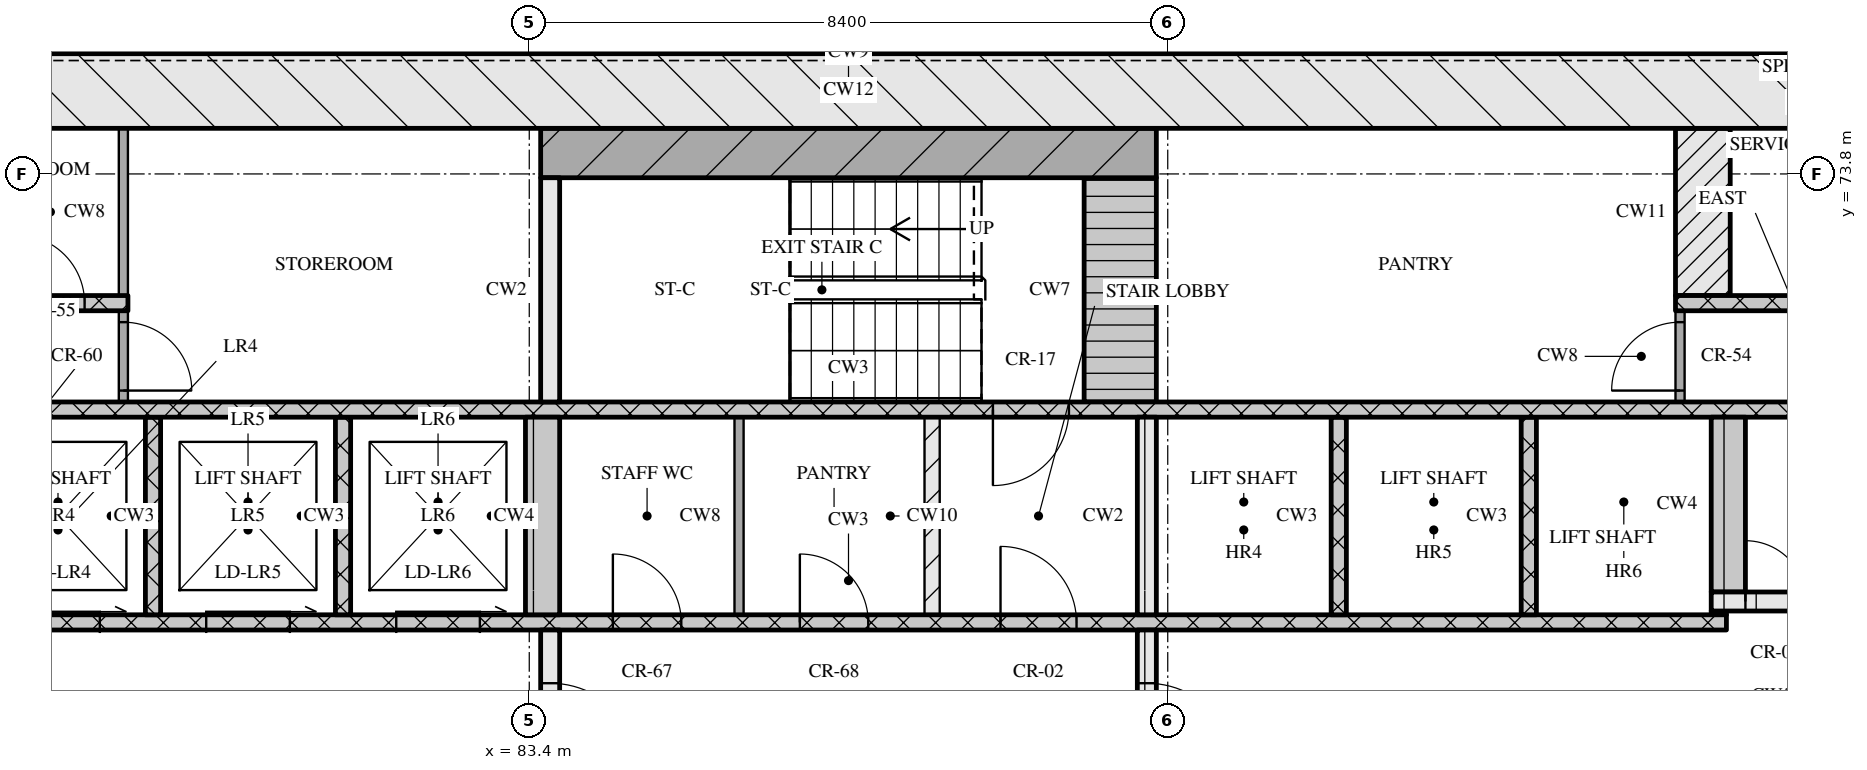
"""IFC4 building model, lengths in metres.
Left out: names, types, materials, properties, quantities, classifications, styles, units other than length and angle.
Written with IfcOpenShell. Run it as: python <this file> out.ifc"""

import sys

from ifc_helpers import new_model, si_unit, direction, frame, frame_2d, origin, place, context, subcontext, project, spatial, rectangle, extrude, element, fill, save


model = new_model("IFC4")
c1 = context("Model", 3, precision=1e-05, world=origin(), true_north=direction((0.0, 1.0)))
c2 = subcontext(c1, "Body", "Model", "MODEL_VIEW")
j1 = project(units=[si_unit("LENGTHUNIT", "METRE"), si_unit("PLANEANGLEUNIT", "RADIAN")], contexts=[c1])
p1 = place(None, origin())
s1 = spatial("IfcSite", under=j1, at=p1, CompositionType="ELEMENT")
p2 = place(p1, origin())
s2 = spatial("IfcBuilding", under=s1, at=p2, CompositionType="ELEMENT")
p3 = place(p2, frame((0.0, 0.0, 134.85)))
s3 = spatial("IfcBuildingStorey", under=s2, at=p3, CompositionType="ELEMENT", Elevation=134.85)
p4 = place(p3, frame((66.8, 74.9, 0.0), z_axis=(0.0, 0.0, 1.0), x_axis=(1.0, 0.0, 0.0)))
e1 = element("IfcWall", 1, at=p4, inside=s3, PredefinedType="SOLIDWALL", context=c2, shape_type="SweptSolid", body=[
    extrude(rectangle(XDim=41.6, YDim=1.0, at=frame_2d((20.8, 0.0))), origin(), (0.0, 0.0, 1.0), 3.32),
])
p5 = place(p3, frame((83.675, 65.2, 0.0), z_axis=(0.0, 0.0, 1.0), x_axis=(0.0, 1.0, 0.0)))
e2 = element("IfcWall", 2, at=p5, inside=s3, PredefinedType="SOLIDWALL", context=c2, shape_type="SweptSolid", body=[
    extrude(rectangle(XDim=2.6, YDim=0.25, at=frame_2d((1.3, 0.0))), origin(), (0.0, 0.0, 1.0), 3.32),
])
p6 = place(p5, frame((0.7, 0.0, 0.0)))
e3 = element("IfcOpeningElement", 3, at=p6, cuts=e2, PredefinedType="OPENING", context=c2, shape_type="SweptSolid", body=[
    extrude(rectangle(XDim=1.2, YDim=2.1, at=frame_2d((0.6, 1.05))), frame((0.0, 0.135, 0.0), z_axis=(0.0, -1.0, 0.0), x_axis=(1.0, 0.0, 0.0)), (0.0, 0.0, 1.0), 0.27),
])
p7 = place(p3, frame((91.525, 65.2, 0.0), z_axis=(0.0, 0.0, 1.0), x_axis=(0.0, 1.0, 0.0)))
e4 = element("IfcWall", 4, at=p7, inside=s3, PredefinedType="SOLIDWALL", context=c2, shape_type="SweptSolid", body=[
    extrude(rectangle(XDim=2.6, YDim=0.25, at=frame_2d((1.3, 0.0))), origin(), (0.0, 0.0, 1.0), 3.32),
])
p8 = place(p7, frame((0.7, 0.0, 0.0)))
e5 = element("IfcOpeningElement", 5, at=p8, cuts=e4, PredefinedType="OPENING", context=c2, shape_type="SweptSolid", body=[
    extrude(rectangle(XDim=1.2, YDim=2.1, at=frame_2d((0.6, 1.05))), frame((0.0, 0.135, 0.0), z_axis=(0.0, -1.0, 0.0), x_axis=(1.0, 0.0, 0.0)), (0.0, 0.0, 1.0), 0.27),
])
p9 = place(p3, frame((76.05, 67.9, 0.0), z_axis=(0.0, 0.0, 1.0), x_axis=(1.0, 0.0, 0.0)))
e6 = element("IfcWall", 6, at=p9, inside=s3, PredefinedType="SOLIDWALL", context=c2, shape_type="SweptSolid", body=[
    extrude(rectangle(XDim=23.1, YDim=0.2, at=frame_2d((11.55, 0.0))), origin(), (0.0, 0.0, 1.0), 3.32),
])
p10 = place(p9, frame((0.6, 0.0, 0.0)))
e7 = element("IfcOpeningElement", 7, at=p10, cuts=e6, PredefinedType="OPENING", context=c2, shape_type="SweptSolid", body=[
    extrude(rectangle(XDim=1.1, YDim=2.1, at=frame_2d((0.55, 1.05))), frame((0.0, 0.11, 0.0), z_axis=(0.0, -1.0, 0.0), x_axis=(1.0, 0.0, 0.0)), (0.0, 0.0, 1.0), 0.22),
])
p11 = place(p9, frame((3.1, 0.0, 0.0)))
e8 = element("IfcOpeningElement", 8, at=p11, cuts=e6, PredefinedType="OPENING", context=c2, shape_type="SweptSolid", body=[
    extrude(rectangle(XDim=1.1, YDim=2.1, at=frame_2d((0.55, 1.05))), frame((0.0, 0.11, 0.0), z_axis=(0.0, -1.0, 0.0), x_axis=(1.0, 0.0, 0.0)), (0.0, 0.0, 1.0), 0.22),
])
p12 = place(p9, frame((5.6, 0.0, 0.0)))
e9 = element("IfcOpeningElement", 9, at=p12, cuts=e6, PredefinedType="OPENING", context=c2, shape_type="SweptSolid", body=[
    extrude(rectangle(XDim=1.1, YDim=2.1, at=frame_2d((0.55, 1.05))), frame((0.0, 0.11, 0.0), z_axis=(0.0, -1.0, 0.0), x_axis=(1.0, 0.0, 0.0)), (0.0, 0.0, 1.0), 0.22),
])
p13 = place(p9, frame((8.45, 0.0, 0.0)))
e10 = element("IfcOpeningElement", 10, at=p13, cuts=e6, PredefinedType="OPENING", context=c2, shape_type="SweptSolid", body=[
    extrude(rectangle(XDim=0.9, YDim=2.1, at=frame_2d((0.45, 1.05))), frame((0.0, 0.11, 0.0), z_axis=(0.0, -1.0, 0.0), x_axis=(1.0, 0.0, 0.0)), (0.0, 0.0, 1.0), 0.22),
])
p14 = place(p9, frame((10.91, 0.0, 0.0)))
e11 = element("IfcOpeningElement", 11, at=p14, cuts=e6, PredefinedType="OPENING", context=c2, shape_type="SweptSolid", body=[
    extrude(rectangle(XDim=0.9, YDim=2.1, at=frame_2d((0.45, 1.05))), frame((0.0, 0.11, 0.0), z_axis=(0.0, -1.0, 0.0), x_axis=(1.0, 0.0, 0.0)), (0.0, 0.0, 1.0), 0.22),
])
p15 = place(p9, frame((13.55, 0.0, 0.0)))
e12 = element("IfcOpeningElement", 12, at=p15, cuts=e6, PredefinedType="OPENING", context=c2, shape_type="SweptSolid", body=[
    extrude(rectangle(XDim=1.0, YDim=2.1, at=frame_2d((0.5, 1.05))), frame((0.0, 0.11, 0.0), z_axis=(0.0, -1.0, 0.0), x_axis=(1.0, 0.0, 0.0)), (0.0, 0.0, 1.0), 0.22),
])
for number, where, z_axis, x_axis in (
    (13, (78.45, 68.0, 0.0), (0.0, 0.0, 1.0), (0.0, 1.0, 0.0)),
    (14, (80.95, 68.0, 0.0), (0.0, 0.0, 1.0), (0.0, 1.0, 0.0)),
):
    element("IfcWall", number, at=place(p3, frame(where, z_axis=z_axis, x_axis=x_axis)), inside=s3, PredefinedType="SOLIDWALL", context=c2, shape_type="SweptSolid", body=[
        extrude(rectangle(XDim=2.6, YDim=0.2, at=frame_2d((1.3, 0.0))), origin(), (0.0, 0.0, 1.0), 3.32),
    ])
p16 = place(p3, frame((83.575, 68.0, 0.0), z_axis=(0.0, 0.0, 1.0), x_axis=(0.0, 1.0, 0.0)))
e15 = element("IfcWall", 15, at=p16, inside=s3, PredefinedType="SOLIDWALL", context=c2, shape_type="SweptSolid", body=[
    extrude(rectangle(XDim=2.6, YDim=0.45, at=frame_2d((1.3, 0.0))), origin(), (0.0, 0.0, 1.0), 3.32),
])
p17 = place(p3, frame((86.16, 68.0, 0.0), z_axis=(0.0, 0.0, 1.0), x_axis=(0.0, 1.0, 0.0)))
e16 = element("IfcWall", 16, at=p17, inside=s3, PredefinedType="PARTITIONING", context=c2, shape_type="SweptSolid", body=[
    extrude(rectangle(XDim=2.6, YDim=0.12, at=frame_2d((1.3, 0.0))), origin(), (0.0, 0.0, 1.0), 3.32),
])
p18 = place(p3, frame((88.7, 68.0, 0.0), z_axis=(0.0, 0.0, 1.0), x_axis=(0.0, 1.0, 0.0)))
e17 = element("IfcWall", 17, at=p18, inside=s3, PredefinedType="PARTITIONING", context=c2, shape_type="SweptSolid", body=[
    extrude(rectangle(XDim=2.6, YDim=0.2, at=frame_2d((1.3, 0.0))), origin(), (0.0, 0.0, 1.0), 3.32),
])
p19 = place(p3, frame((91.525, 68.0, 0.0), z_axis=(0.0, 0.0, 1.0), x_axis=(0.0, 1.0, 0.0)))
e18 = element("IfcWall", 18, at=p19, inside=s3, PredefinedType="SOLIDWALL", context=c2, shape_type="SweptSolid", body=[
    extrude(rectangle(XDim=2.6, YDim=0.25, at=frame_2d((1.3, 0.0))), origin(), (0.0, 0.0, 1.0), 3.32),
])
for number, where, z_axis, x_axis in (
    (19, (94.05, 68.0, 0.0), (0.0, 0.0, 1.0), (0.0, 1.0, 0.0)),
    (20, (96.55, 68.0, 0.0), (0.0, 0.0, 1.0), (0.0, 1.0, 0.0)),
):
    element("IfcWall", number, at=place(p3, frame(where, z_axis=z_axis, x_axis=x_axis)), inside=s3, PredefinedType="SOLIDWALL", context=c2, shape_type="SweptSolid", body=[
        extrude(rectangle(XDim=2.6, YDim=0.2, at=frame_2d((1.3, 0.0))), origin(), (0.0, 0.0, 1.0), 3.32),
    ])
p20 = place(p3, frame((98.95, 68.025, 0.0), z_axis=(0.0, 0.0, 1.0), x_axis=(1.0, 0.0, 0.0)))
e21 = element("IfcWall", 21, at=p20, inside=s3, PredefinedType="SOLIDWALL", context=c2, shape_type="SweptSolid", body=[
    extrude(rectangle(XDim=0.2, YDim=0.05, at=frame_2d((0.1, 0.0))), origin(), (0.0, 0.0, 1.0), 3.32),
])
p21 = place(p3, frame((98.95, 68.175, 0.0), z_axis=(0.0, 0.0, 1.0), x_axis=(1.0, 0.0, 0.0)))
e22 = element("IfcWall", 22, at=p21, inside=s3, PredefinedType="SOLIDWALL", context=c2, shape_type="SweptSolid", body=[
    extrude(rectangle(XDim=8.45, YDim=0.25, at=frame_2d((4.225, 0.0))), origin(), (0.0, 0.0, 1.0), 3.32),
])
p22 = place(p21, frame((0.45, 0.0, 0.0)))
e23 = element("IfcOpeningElement", 23, at=p22, cuts=e22, PredefinedType="OPENING", context=c2, shape_type="SweptSolid", body=[
    extrude(rectangle(XDim=0.8, YDim=2.1, at=frame_2d((0.4, 1.05))), frame((0.0, 0.135, 0.0), z_axis=(0.0, -1.0, 0.0), x_axis=(1.0, 0.0, 0.0)), (0.0, 0.0, 1.0), 0.27),
])
p23 = place(p21, frame((1.75, 0.0, 0.0)))
e24 = element("IfcOpeningElement", 24, at=p23, cuts=e22, PredefinedType="OPENING", context=c2, shape_type="SweptSolid", body=[
    extrude(rectangle(XDim=1.0, YDim=2.1, at=frame_2d((0.5, 1.05))), frame((0.0, 0.135, 0.0), z_axis=(0.0, -1.0, 0.0), x_axis=(1.0, 0.0, 0.0)), (0.0, 0.0, 1.0), 0.27),
])
p24 = place(p3, frame((99.175, 68.3, 0.0), z_axis=(0.0, 0.0, 1.0), x_axis=(0.0, 1.0, 0.0)))
e25 = element("IfcWall", 25, at=p24, inside=s3, PredefinedType="SOLIDWALL", context=c2, shape_type="SweptSolid", body=[
    extrude(rectangle(XDim=2.3, YDim=0.45, at=frame_2d((1.15, 0.0))), origin(), (0.0, 0.0, 1.0), 3.32),
])
p25 = place(p3, frame((67.8, 70.7, 0.0), z_axis=(0.0, 0.0, 1.0), x_axis=(1.0, 0.0, 0.0)))
e26 = element("IfcWall", 26, at=p25, inside=s3, PredefinedType="SOLIDWALL", context=c2, shape_type="SweptSolid", body=[
    extrude(rectangle(XDim=39.6, YDim=0.2, at=frame_2d((19.8, 0.0))), origin(), (0.0, 0.0, 1.0), 3.32),
])
p26 = place(p25, frame((0.65, 0.0, 0.0)))
e27 = element("IfcOpeningElement", 27, at=p26, cuts=e26, PredefinedType="OPENING", context=c2, shape_type="SweptSolid", body=[
    extrude(rectangle(XDim=1.1, YDim=2.1, at=frame_2d((0.55, 1.05))), frame((0.0, 0.11, 0.0), z_axis=(0.0, -1.0, 0.0), x_axis=(1.0, 0.0, 0.0)), (0.0, 0.0, 1.0), 0.22),
])
p27 = place(p25, frame((3.25, 0.0, 0.0)))
e28 = element("IfcOpeningElement", 28, at=p27, cuts=e26, PredefinedType="OPENING", context=c2, shape_type="SweptSolid", body=[
    extrude(rectangle(XDim=1.1, YDim=2.1, at=frame_2d((0.55, 1.05))), frame((0.0, 0.11, 0.0), z_axis=(0.0, -1.0, 0.0), x_axis=(1.0, 0.0, 0.0)), (0.0, 0.0, 1.0), 0.22),
])
p28 = place(p25, frame((5.9, 0.0, 0.0)))
e29 = element("IfcOpeningElement", 29, at=p28, cuts=e26, PredefinedType="OPENING", context=c2, shape_type="SweptSolid", body=[
    extrude(rectangle(XDim=1.0, YDim=2.1, at=frame_2d((0.5, 1.05))), frame((0.0, 0.11, 0.0), z_axis=(0.0, -1.0, 0.0), x_axis=(1.0, 0.0, 0.0)), (0.0, 0.0, 1.0), 0.22),
])
p29 = place(p25, frame((21.7, 0.0, 0.0)))
e30 = element("IfcOpeningElement", 30, at=p29, cuts=e26, PredefinedType="OPENING", context=c2, shape_type="SweptSolid", body=[
    extrude(rectangle(XDim=1.0, YDim=2.1, at=frame_2d((0.5, 1.05))), frame((0.0, 0.11, 0.0), z_axis=(0.0, -1.0, 0.0), x_axis=(1.0, 0.0, 0.0)), (0.0, 0.0, 1.0), 0.22),
])
p30 = place(p25, frame((32.7, 0.0, 0.0)))
e31 = element("IfcOpeningElement", 31, at=p30, cuts=e26, PredefinedType="OPENING", context=c2, shape_type="SweptSolid", body=[
    extrude(rectangle(XDim=1.0, YDim=2.1, at=frame_2d((0.5, 1.05))), frame((0.0, 0.11, 0.0), z_axis=(0.0, -1.0, 0.0), x_axis=(1.0, 0.0, 0.0)), (0.0, 0.0, 1.0), 0.22),
])
p31 = place(p25, frame((35.25, 0.0, 0.0)))
e32 = element("IfcOpeningElement", 32, at=p31, cuts=e26, PredefinedType="OPENING", context=c2, shape_type="SweptSolid", body=[
    extrude(rectangle(XDim=1.1, YDim=2.1, at=frame_2d((0.55, 1.05))), frame((0.0, 0.11, 0.0), z_axis=(0.0, -1.0, 0.0), x_axis=(1.0, 0.0, 0.0)), (0.0, 0.0, 1.0), 0.22),
])
p32 = place(p25, frame((37.85, 0.0, 0.0)))
e33 = element("IfcOpeningElement", 33, at=p32, cuts=e26, PredefinedType="OPENING", context=c2, shape_type="SweptSolid", body=[
    extrude(rectangle(XDim=1.1, YDim=2.1, at=frame_2d((0.55, 1.05))), frame((0.0, 0.11, 0.0), z_axis=(0.0, -1.0, 0.0), x_axis=(1.0, 0.0, 0.0)), (0.0, 0.0, 1.0), 0.22),
])
p33 = place(p3, frame((78.06, 70.8, 0.0), z_axis=(0.0, 0.0, 1.0), x_axis=(0.0, 1.0, 0.0)))
e34 = element("IfcWall", 34, at=p33, inside=s3, PredefinedType="PARTITIONING", context=c2, shape_type="SweptSolid", body=[
    extrude(rectangle(XDim=1.2, YDim=0.12, at=frame_2d((0.6, 0.0))), origin(), (0.0, 0.0, 1.0), 3.32),
])
p34 = place(p33, frame((0.15, 0.0, 0.0)))
e35 = element("IfcOpeningElement", 35, at=p34, cuts=e34, PredefinedType="OPENING", context=c2, shape_type="SweptSolid", body=[
    extrude(rectangle(XDim=0.9, YDim=2.1, at=frame_2d((0.45, 1.05))), frame((0.0, 0.07, 0.0), z_axis=(0.0, -1.0, 0.0), x_axis=(1.0, 0.0, 0.0)), (0.0, 0.0, 1.0), 0.14),
])
p35 = place(p3, frame((83.675, 70.8, 0.0), z_axis=(0.0, 0.0, 1.0), x_axis=(0.0, 1.0, 0.0)))
e36 = element("IfcWall", 36, at=p35, inside=s3, PredefinedType="SOLIDWALL", context=c2, shape_type="SweptSolid", body=[
    extrude(rectangle(XDim=2.95, YDim=0.25, at=frame_2d((1.475, 0.0))), origin(), (0.0, 0.0, 1.0), 3.32),
])
p36 = place(p3, frame((91.175, 70.8, 0.0), z_axis=(0.0, 0.0, 1.0), x_axis=(0.0, 1.0, 0.0)))
e37 = element("IfcWall", 37, at=p36, inside=s3, PredefinedType="SOLIDWALL", context=c2, shape_type="SweptSolid", body=[
    extrude(rectangle(XDim=2.95, YDim=0.95, at=frame_2d((1.475, 0.0))), origin(), (0.0, 0.0, 1.0), 3.32),
])
p37 = place(p3, frame((98.54, 70.8, 0.0), z_axis=(0.0, 0.0, 1.0), x_axis=(0.0, 1.0, 0.0)))
e38 = element("IfcWall", 38, at=p37, inside=s3, PredefinedType="PARTITIONING", context=c2, shape_type="SweptSolid", body=[
    extrude(rectangle(XDim=1.2, YDim=0.12, at=frame_2d((0.6, 0.0))), origin(), (0.0, 0.0, 1.0), 3.32),
])
p38 = place(p37, frame((0.15, 0.0, 0.0)))
e39 = element("IfcOpeningElement", 39, at=p38, cuts=e38, PredefinedType="OPENING", context=c2, shape_type="SweptSolid", body=[
    extrude(rectangle(XDim=0.9, YDim=2.1, at=frame_2d((0.45, 1.05))), frame((0.0, 0.07, 0.0), z_axis=(0.0, -1.0, 0.0), x_axis=(1.0, 0.0, 0.0)), (0.0, 0.0, 1.0), 0.14),
])
p39 = place(p3, frame((72.8, 72.1, 0.0), z_axis=(0.0, 0.0, 1.0), x_axis=(1.0, 0.0, 0.0)))
e40 = element("IfcWall", 40, at=p39, inside=s3, PredefinedType="SOLIDWALL", context=c2, shape_type="SweptSolid", body=[
    extrude(rectangle(XDim=5.32, YDim=0.2, at=frame_2d((2.66, 0.0))), origin(), (0.0, 0.0, 1.0), 3.32),
])
p40 = place(p39, frame((1.25, 0.0, 0.0)))
e41 = element("IfcOpeningElement", 41, at=p40, cuts=e40, PredefinedType="OPENING", context=c2, shape_type="SweptSolid", body=[
    extrude(rectangle(XDim=0.9, YDim=2.1, at=frame_2d((0.45, 1.05))), frame((0.0, 0.11, 0.0), z_axis=(0.0, -1.0, 0.0), x_axis=(1.0, 0.0, 0.0)), (0.0, 0.0, 1.0), 0.22),
])
p41 = place(p39, frame((3.85, 0.0, 0.0)))
e42 = element("IfcOpeningElement", 42, at=p41, cuts=e40, PredefinedType="OPENING", context=c2, shape_type="SweptSolid", body=[
    extrude(rectangle(XDim=0.9, YDim=2.1, at=frame_2d((0.45, 1.05))), frame((0.0, 0.11, 0.0), z_axis=(0.0, -1.0, 0.0), x_axis=(1.0, 0.0, 0.0)), (0.0, 0.0, 1.0), 0.22),
])
p42 = place(p3, frame((98.48, 72.1, 0.0), z_axis=(0.0, 0.0, 1.0), x_axis=(1.0, 0.0, 0.0)))
e43 = element("IfcWall", 43, at=p42, inside=s3, PredefinedType="SOLIDWALL", context=c2, shape_type="SweptSolid", body=[
    extrude(rectangle(XDim=3.92, YDim=0.2, at=frame_2d((1.96, 0.0))), origin(), (0.0, 0.0, 1.0), 3.32),
])
p43 = place(p42, frame((1.77, 0.0, 0.0)))
e44 = element("IfcOpeningElement", 44, at=p43, cuts=e43, PredefinedType="OPENING", context=c2, shape_type="SweptSolid", body=[
    extrude(rectangle(XDim=0.9, YDim=2.1, at=frame_2d((0.45, 1.05))), frame((0.0, 0.11, 0.0), z_axis=(0.0, -1.0, 0.0), x_axis=(1.0, 0.0, 0.0)), (0.0, 0.0, 1.0), 0.22),
])
p44 = place(p3, frame((78.06, 72.2, 0.0), z_axis=(0.0, 0.0, 1.0), x_axis=(0.0, 1.0, 0.0)))
e45 = element("IfcWall", 45, at=p44, inside=s3, PredefinedType="PARTITIONING", context=c2, shape_type="SweptSolid", body=[
    extrude(rectangle(XDim=2.2, YDim=0.12, at=frame_2d((1.1, 0.0))), origin(), (0.0, 0.0, 1.0), 3.32),
])
p45 = place(p3, frame((98.84, 72.2, 0.0), z_axis=(0.0, 0.0, 1.0), x_axis=(0.0, 1.0, 0.0)))
e46 = element("IfcWall", 46, at=p45, inside=s3, PredefinedType="SOLIDWALL", context=c2, shape_type="SweptSolid", body=[
    extrude(rectangle(XDim=2.2, YDim=0.72, at=frame_2d((1.1, 0.0))), origin(), (0.0, 0.0, 1.0), 3.32),
])
p46 = place(p3, frame((83.55, 74.075, 0.0), z_axis=(0.0, 0.0, 1.0), x_axis=(1.0, 0.0, 0.0)))
e47 = element("IfcWall", 47, at=p46, inside=s3, PredefinedType="SOLIDWALL", context=c2, shape_type="SweptSolid", body=[
    extrude(rectangle(XDim=8.1, YDim=0.65, at=frame_2d((4.05, 0.0))), origin(), (0.0, 0.0, 1.0), 3.32),
])
p47 = place(p6, origin())
e48 = element("IfcDoor", 48, at=p47, inside=s3, OperationType="SINGLE_SWING_RIGHT", PredefinedType="DOOR", context=c2, shape_type="SweptSolid", body=[
    extrude(rectangle(XDim=1.2, YDim=2.1, at=frame_2d((0.6, 1.05))), frame((0.0, 0.025, 0.0), z_axis=(0.0, -1.0, 0.0), x_axis=(1.0, 0.0, 0.0)), (0.0, 0.0, 1.0), 0.05),
])
fill(e3, e48)
p48 = place(p8, origin())
e49 = element("IfcDoor", 49, at=p48, inside=s3, OperationType="SINGLE_SWING_RIGHT", PredefinedType="DOOR", context=c2, shape_type="SweptSolid", body=[
    extrude(rectangle(XDim=1.2, YDim=2.1, at=frame_2d((0.6, 1.05))), frame((0.0, 0.025, 0.0), z_axis=(0.0, -1.0, 0.0), x_axis=(1.0, 0.0, 0.0)), (0.0, 0.0, 1.0), 0.05),
])
fill(e5, e49)
p49 = place(p10, origin())
e50 = element("IfcDoor", 50, at=p49, inside=s3, OperationType="SLIDING_TO_RIGHT", PredefinedType="DOOR", context=c2, shape_type="SweptSolid", body=[
    extrude(rectangle(XDim=1.1, YDim=2.1, at=frame_2d((0.55, 1.05))), frame((0.0, 0.025, 0.0), z_axis=(0.0, -1.0, 0.0), x_axis=(1.0, 0.0, 0.0)), (0.0, 0.0, 1.0), 0.05),
])
fill(e7, e50)
p50 = place(p11, origin())
e51 = element("IfcDoor", 51, at=p50, inside=s3, OperationType="SLIDING_TO_RIGHT", PredefinedType="DOOR", context=c2, shape_type="SweptSolid", body=[
    extrude(rectangle(XDim=1.1, YDim=2.1, at=frame_2d((0.55, 1.05))), frame((0.0, 0.025, 0.0), z_axis=(0.0, -1.0, 0.0), x_axis=(1.0, 0.0, 0.0)), (0.0, 0.0, 1.0), 0.05),
])
fill(e8, e51)
p51 = place(p12, origin())
e52 = element("IfcDoor", 52, at=p51, inside=s3, OperationType="SLIDING_TO_RIGHT", PredefinedType="DOOR", context=c2, shape_type="SweptSolid", body=[
    extrude(rectangle(XDim=1.1, YDim=2.1, at=frame_2d((0.55, 1.05))), frame((0.0, 0.025, 0.0), z_axis=(0.0, -1.0, 0.0), x_axis=(1.0, 0.0, 0.0)), (0.0, 0.0, 1.0), 0.05),
])
fill(e9, e52)
p52 = place(p13, origin())
e53 = element("IfcDoor", 53, at=p52, inside=s3, OperationType="SINGLE_SWING_LEFT", PredefinedType="DOOR", context=c2, shape_type="SweptSolid", body=[
    extrude(rectangle(XDim=0.9, YDim=2.1, at=frame_2d((0.45, 1.05))), frame((0.0, 0.025, 0.0), z_axis=(0.0, -1.0, 0.0), x_axis=(1.0, 0.0, 0.0)), (0.0, 0.0, 1.0), 0.05),
])
fill(e10, e53)
p53 = place(p14, origin())
e54 = element("IfcDoor", 54, at=p53, inside=s3, OperationType="SINGLE_SWING_LEFT", PredefinedType="DOOR", context=c2, shape_type="SweptSolid", body=[
    extrude(rectangle(XDim=0.9, YDim=2.1, at=frame_2d((0.45, 1.05))), frame((0.0, 0.025, 0.0), z_axis=(0.0, -1.0, 0.0), x_axis=(1.0, 0.0, 0.0)), (0.0, 0.0, 1.0), 0.05),
])
fill(e11, e54)
p54 = place(p15, origin())
e55 = element("IfcDoor", 55, at=p54, inside=s3, OperationType="SINGLE_SWING_LEFT", PredefinedType="DOOR", context=c2, shape_type="SweptSolid", body=[
    extrude(rectangle(XDim=1.0, YDim=2.1, at=frame_2d((0.5, 1.05))), frame((0.0, 0.025, 0.0), z_axis=(0.0, -1.0, 0.0), x_axis=(1.0, 0.0, 0.0)), (0.0, 0.0, 1.0), 0.05),
])
fill(e12, e55)
p55 = place(p22, origin())
e56 = element("IfcDoor", 56, at=p55, inside=s3, OperationType="SINGLE_SWING_LEFT", PredefinedType="DOOR", context=c2, shape_type="SweptSolid", body=[
    extrude(rectangle(XDim=0.8, YDim=2.1, at=frame_2d((0.4, 1.05))), frame((0.0, 0.025, 0.0), z_axis=(0.0, -1.0, 0.0), x_axis=(1.0, 0.0, 0.0)), (0.0, 0.0, 1.0), 0.05),
])
fill(e23, e56)
p56 = place(p29, origin())
e57 = element("IfcDoor", 57, at=p56, inside=s3, OperationType="SINGLE_SWING_RIGHT", PredefinedType="DOOR", context=c2, shape_type="SweptSolid", body=[
    extrude(rectangle(XDim=1.0, YDim=2.1, at=frame_2d((0.5, 1.05))), frame((0.0, 0.025, 0.0), z_axis=(0.0, -1.0, 0.0), x_axis=(1.0, 0.0, 0.0)), (0.0, 0.0, 1.0), 0.05),
])
fill(e30, e57)
p57 = place(p34, origin())
e58 = element("IfcDoor", 58, at=p57, inside=s3, OperationType="SINGLE_SWING_RIGHT", PredefinedType="DOOR", context=c2, shape_type="SweptSolid", body=[
    extrude(rectangle(XDim=0.9, YDim=2.1, at=frame_2d((0.45, 1.05))), frame((0.0, 0.025, 0.0), z_axis=(0.0, -1.0, 0.0), x_axis=(1.0, 0.0, 0.0)), (0.0, 0.0, 1.0), 0.05),
])
fill(e35, e58)
p58 = place(p38, origin())
e59 = element("IfcDoor", 59, at=p58, inside=s3, OperationType="SINGLE_SWING_LEFT", PredefinedType="DOOR", context=c2, shape_type="SweptSolid", body=[
    extrude(rectangle(XDim=0.9, YDim=2.1, at=frame_2d((0.45, 1.05))), frame((0.0, 0.025, 0.0), z_axis=(0.0, -1.0, 0.0), x_axis=(1.0, 0.0, 0.0)), (0.0, 0.0, 1.0), 0.05),
])
fill(e39, e59)
p59 = place(p41, origin())
e60 = element("IfcDoor", 60, at=p59, inside=s3, OperationType="SINGLE_SWING_LEFT", PredefinedType="DOOR", context=c2, shape_type="SweptSolid", body=[
    extrude(rectangle(XDim=0.9, YDim=2.1, at=frame_2d((0.45, 1.05))), frame((0.0, 0.025, 0.0), z_axis=(0.0, -1.0, 0.0), x_axis=(1.0, 0.0, 0.0)), (0.0, 0.0, 1.0), 0.05),
])
fill(e42, e60)
save(model, sys.argv[1])
